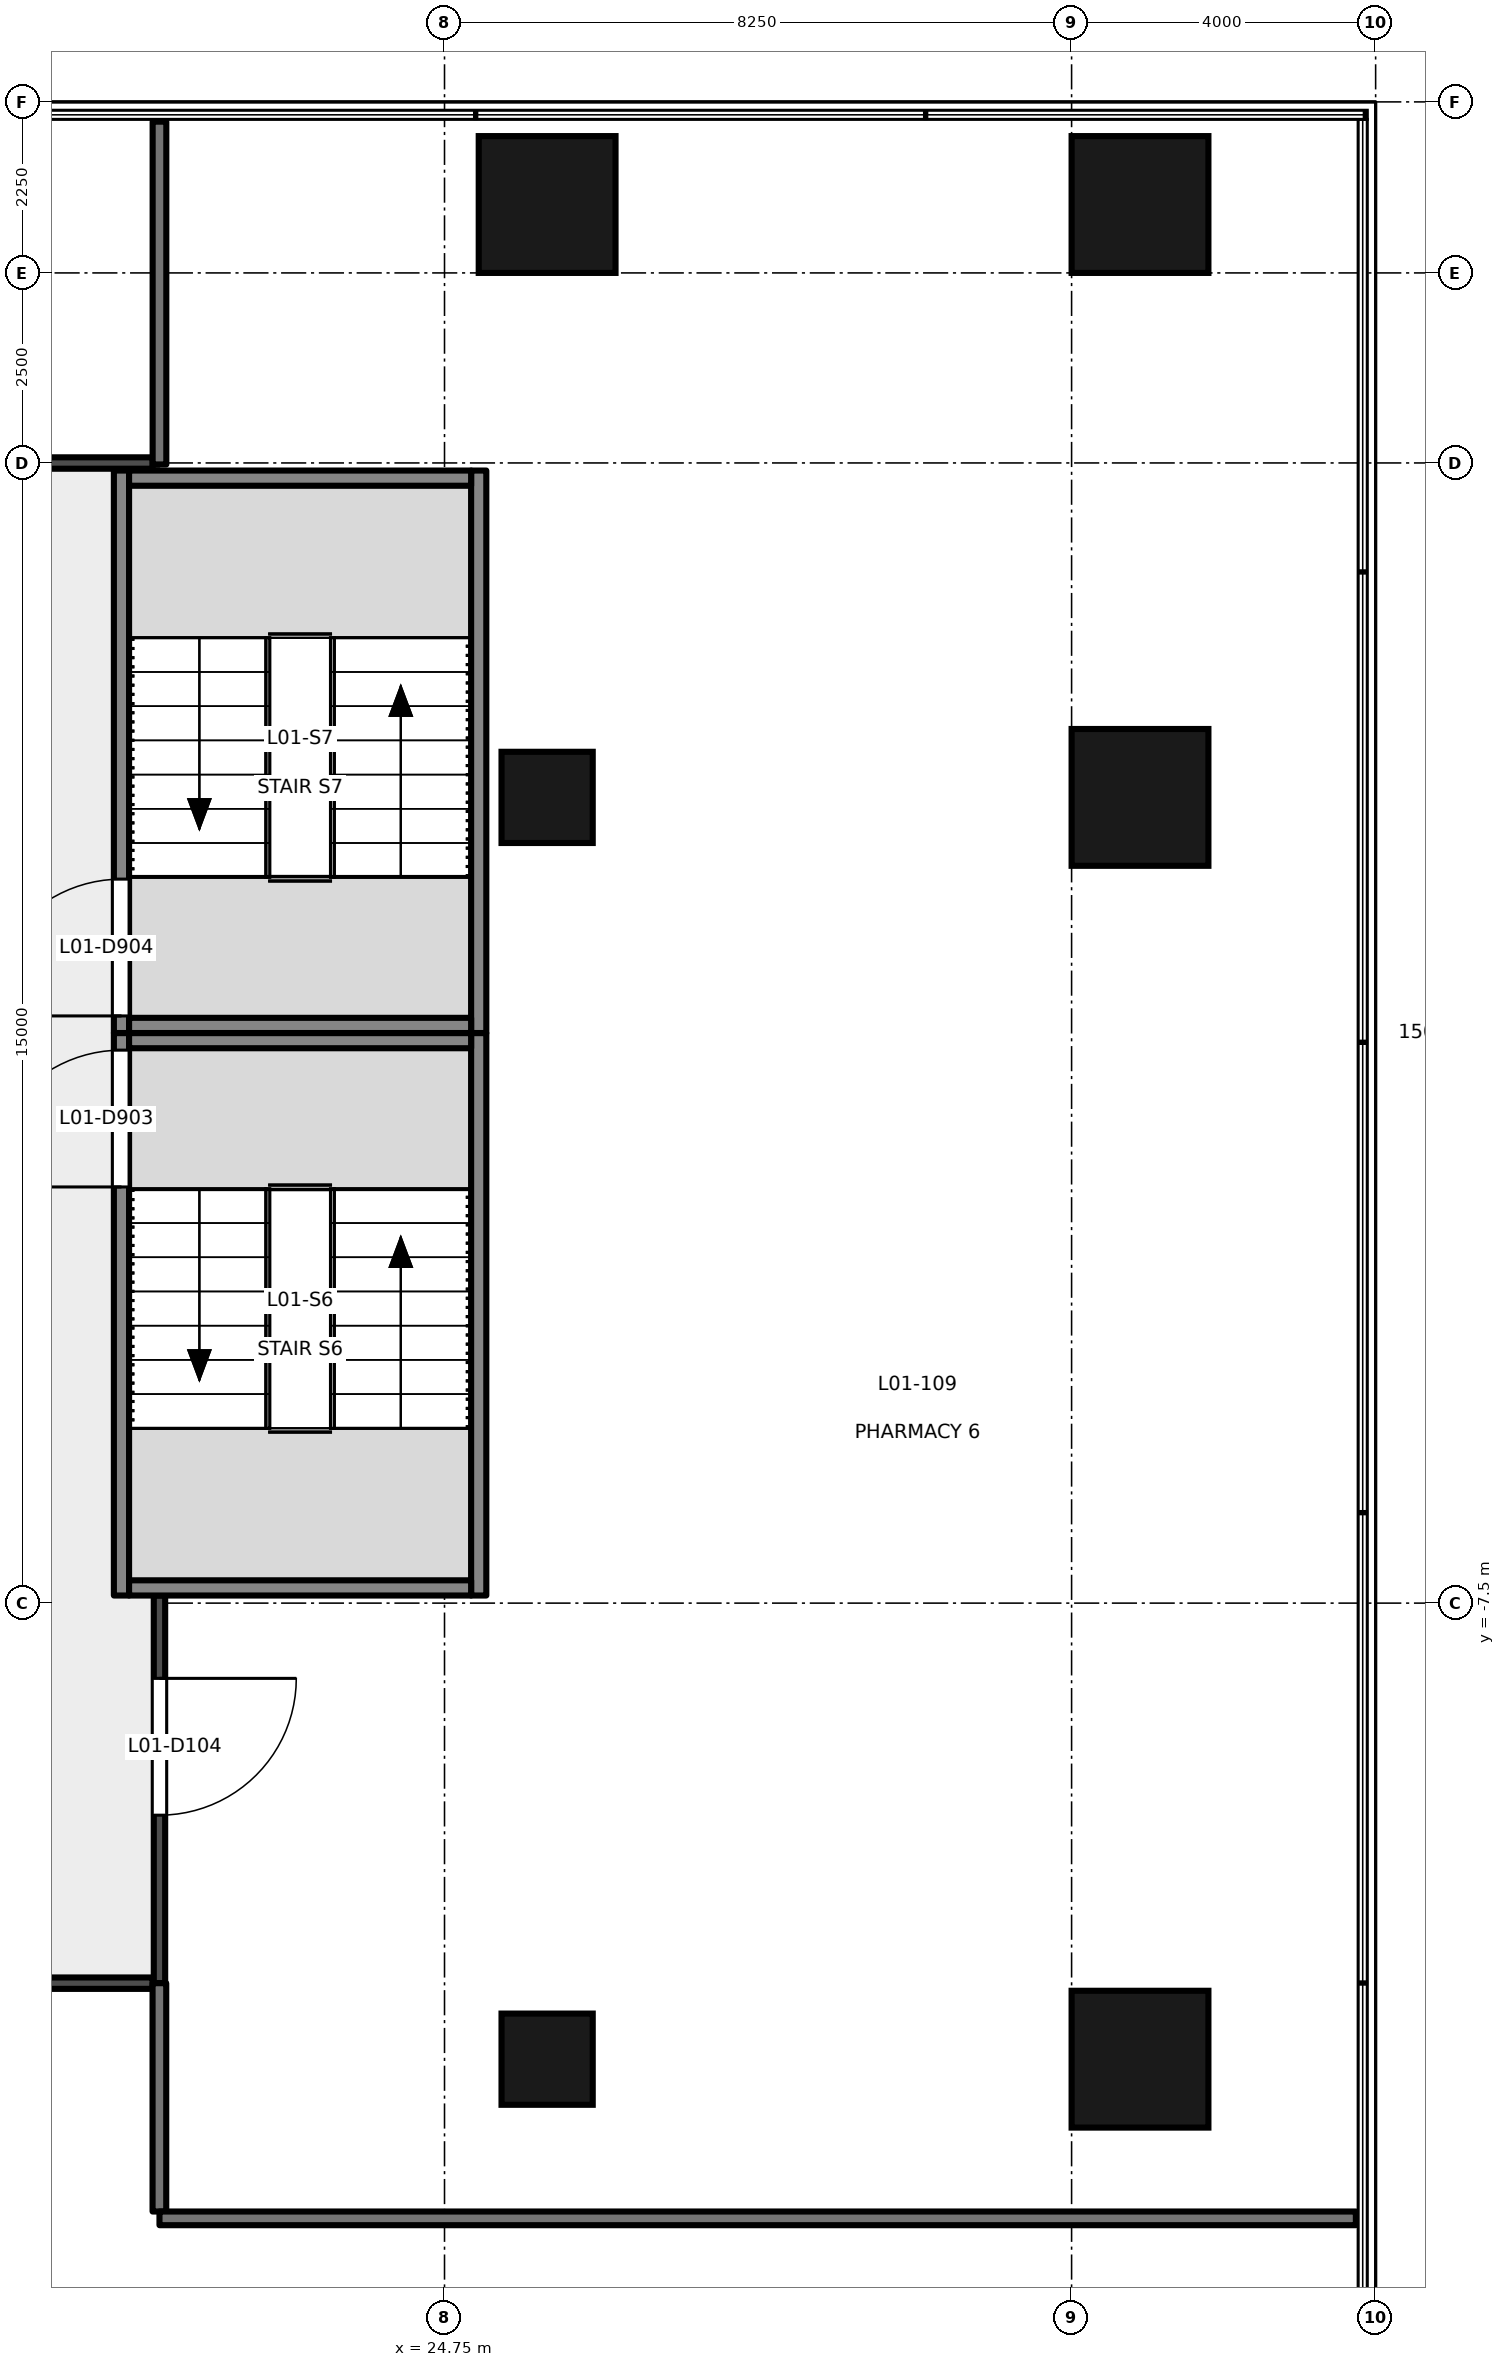
"""IFC4 building model, lengths in metres.
Left out: names, types, materials, properties, quantities, classifications, styles, units other than length and angle.
Written with IfcOpenShell. Run it as: python <this file> out.ifc"""

import sys

from ifc_helpers import new_model, si_unit, direction, frame, frame_2d, origin, origin_2d, place, context, subcontext, project, spatial, rectangle, extrude, element, fill, save


model = new_model("IFC4")
c1 = context("Model", 3, precision=1e-05, world=origin(), true_north=direction((0.0, 1.0)))
c2 = subcontext(c1, "Body", "Model", "MODEL_VIEW")
j1 = project(units=[si_unit("LENGTHUNIT", "METRE"), si_unit("PLANEANGLEUNIT", "RADIAN")], contexts=[c1])
p1 = place(None, origin())
s1 = spatial("IfcSite", under=j1, at=p1, CompositionType="ELEMENT")
p2 = place(p1, origin())
s2 = spatial("IfcBuilding", under=s1, at=p2, CompositionType="ELEMENT")
p3 = place(p2, frame((0.0, 0.0, 7.2)))
s3 = spatial("IfcBuildingStorey", under=s2, at=p3, CompositionType="ELEMENT", Elevation=7.2)
for number, where, z_axis, x_axis in (
    (1, (33.9, 10.9, -0.2), (0.0, 0.0, 1.0), (1.0, 0.0, 0.0)),
    (2, (33.9, -13.5, -0.2), (0.0, 0.0, 1.0), (0.0, 1.0, 0.0)),
    (3, (33.9, 3.1, -0.2), (0.0, 0.0, 1.0), (0.0, 1.0, 0.0)),
    (4, (26.1, 10.9, -0.2), (0.0, 0.0, 1.0), (1.0, 0.0, 0.0)),
):
    element("IfcColumn", number, at=place(p3, frame(where, z_axis=z_axis, x_axis=x_axis)), inside=s3, PredefinedType="COLUMN", context=c2, shape_type="SweptSolid", body=[
        extrude(rectangle(XDim=1.8, YDim=1.8, at=origin_2d()), origin(), (0.0, 0.0, 1.0), 5.4),
    ])
for number, where, z_axis, x_axis in (
    (5, (26.1, -13.5, -0.2), (0.0, 0.0, 1.0), (1.0, 0.0, 0.0)),
    (6, (26.1, 3.1, -0.2), (0.0, 0.0, 1.0), (1.0, 0.0, 0.0)),
):
    element("IfcColumn", number, at=place(p3, frame(where, z_axis=z_axis, x_axis=x_axis)), inside=s3, PredefinedType="COLUMN", context=c2, shape_type="SweptSolid", body=[
        extrude(rectangle(XDim=1.2, YDim=1.2, at=origin_2d()), origin(), (0.0, 0.0, 1.0), 5.4),
    ])
p4 = place(p3, frame((20.5, -7.4, -0.2), z_axis=(0.0, 0.0, 1.0), x_axis=(0.0, 1.0, 0.0)))
e7 = element("IfcWall", 7, at=p4, inside=s3, PredefinedType="SHEAR", context=c2, shape_type="SweptSolid", body=[
    extrude(rectangle(XDim=7.4, YDim=0.2, at=frame_2d((3.7, 0.0))), origin(), (0.0, 0.0, 1.0), 5.4),
])
p5 = place(p4, frame((5.375, 0.0, 0.2)))
e8 = element("IfcOpeningElement", 8, at=p5, cuts=e7, PredefinedType="OPENING", context=c2, shape_type="SweptSolid", body=[
    extrude(rectangle(XDim=1.8, YDim=2.1, at=frame_2d((0.9, 1.05))), frame((0.0, 0.111, 0.0), z_axis=(0.0, -1.0, 0.0), x_axis=(1.0, 0.0, 0.0)), (0.0, 0.0, 1.0), 0.221),
])
p6 = place(p3, frame((25.2, -7.4, -0.2), z_axis=(0.0, 0.0, 1.0), x_axis=(0.0, 1.0, 0.0)))
e9 = element("IfcWall", 9, at=p6, inside=s3, PredefinedType="SHEAR", context=c2, shape_type="SweptSolid", body=[
    extrude(rectangle(XDim=7.4, YDim=0.2, at=frame_2d((3.7, 0.0))), origin(), (0.0, 0.0, 1.0), 5.4),
])
for number, where, z_axis, x_axis in (
    (10, (20.6, -0.1, -0.2), (0.0, 0.0, 1.0), (1.0, 0.0, 0.0)),
    (11, (20.6, -7.3, -0.2), (0.0, 0.0, 1.0), (1.0, 0.0, 0.0)),
):
    element("IfcWall", number, at=place(p3, frame(where, z_axis=z_axis, x_axis=x_axis)), inside=s3, PredefinedType="SHEAR", context=c2, shape_type="SweptSolid", body=[
        extrude(rectangle(XDim=4.5, YDim=0.2, at=frame_2d((2.25, 0.0))), origin(), (0.0, 0.0, 1.0), 5.4),
    ])
p7 = place(p3, frame((20.5, 0.0, -0.2), z_axis=(0.0, 0.0, 1.0), x_axis=(0.0, 1.0, 0.0)))
e12 = element("IfcWall", 12, at=p7, inside=s3, PredefinedType="SHEAR", context=c2, shape_type="SweptSolid", body=[
    extrude(rectangle(XDim=7.4, YDim=0.2, at=frame_2d((3.7, 0.0))), origin(), (0.0, 0.0, 1.0), 5.4),
])
p8 = place(p7, frame((0.225, 0.0, 0.2)))
e13 = element("IfcOpeningElement", 13, at=p8, cuts=e12, PredefinedType="OPENING", context=c2, shape_type="SweptSolid", body=[
    extrude(rectangle(XDim=1.8, YDim=2.1, at=frame_2d((0.9, 1.05))), frame((0.0, 0.111, 0.0), z_axis=(0.0, -1.0, 0.0), x_axis=(1.0, 0.0, 0.0)), (0.0, 0.0, 1.0), 0.221),
])
p9 = place(p3, frame((25.2, 0.0, -0.2), z_axis=(0.0, 0.0, 1.0), x_axis=(0.0, 1.0, 0.0)))
e14 = element("IfcWall", 14, at=p9, inside=s3, PredefinedType="SHEAR", context=c2, shape_type="SweptSolid", body=[
    extrude(rectangle(XDim=7.4, YDim=0.2, at=frame_2d((3.7, 0.0))), origin(), (0.0, 0.0, 1.0), 5.4),
])
for number, where, z_axis, x_axis in (
    (15, (20.6, 7.3, -0.2), (0.0, 0.0, 1.0), (1.0, 0.0, 0.0)),
    (16, (20.6, 0.1, -0.2), (0.0, 0.0, 1.0), (1.0, 0.0, 0.0)),
):
    element("IfcWall", number, at=place(p3, frame(where, z_axis=z_axis, x_axis=x_axis)), inside=s3, PredefinedType="SHEAR", context=c2, shape_type="SweptSolid", body=[
        extrude(rectangle(XDim=4.5, YDim=0.2, at=frame_2d((2.25, 0.0))), origin(), (0.0, 0.0, 1.0), 5.4),
    ])
p10 = place(p3, frame((20.909, -12.5, 0.0), z_axis=(0.0, 0.0, 1.0), x_axis=(-1.0, 0.0, 0.0)))
e17 = element("IfcWall", 17, at=p10, inside=s3, PredefinedType="PARTITIONING", context=c2, shape_type="SweptSolid", body=[
    extrude(rectangle(XDim=19.339, YDim=0.15, at=frame_2d((9.669, 0.0))), origin(), (0.0, 0.0, 1.0), 3.8),
])
p11 = place(p10, frame((8.77, 0.0, 0.0)))
e18 = element("IfcOpeningElement", 18, at=p11, cuts=e17, PredefinedType="OPENING", context=c2, shape_type="SweptSolid", body=[
    extrude(rectangle(XDim=1.8, YDim=2.1, at=frame_2d((0.9, 1.05))), frame((0.0, 0.085, 0.0), z_axis=(0.0, -1.0, 0.0), x_axis=(1.0, 0.0, 0.0)), (0.0, 0.0, 1.0), 0.171),
])
p12 = place(p3, frame((21.0, -7.4, 0.0), z_axis=(0.0, 0.0, 1.0), x_axis=(0.0, -1.0, 0.0)))
e19 = element("IfcWall", 19, at=p12, inside=s3, PredefinedType="PARTITIONING", context=c2, shape_type="SweptSolid", body=[
    extrude(rectangle(XDim=5.1, YDim=0.15, at=frame_2d((2.55, 0.0))), origin(), (0.0, 0.0, 1.0), 5.2),
])
p13 = place(p12, frame((1.09, 0.0, 0.0)))
e20 = element("IfcOpeningElement", 20, at=p13, cuts=e19, PredefinedType="OPENING", context=c2, shape_type="SweptSolid", body=[
    extrude(rectangle(XDim=1.8, YDim=2.1, at=frame_2d((0.9, 1.05))), frame((0.0, 0.085, 0.0), z_axis=(0.0, -1.0, 0.0), x_axis=(1.0, 0.0, 0.0)), (0.0, 0.0, 1.0), 0.171),
])
p14 = place(p3, frame((18.0, 7.499, 0.0), z_axis=(0.0, 0.0, 1.0), x_axis=(1.0, 0.0, 0.0)))
e21 = element("IfcWall", 21, at=p14, inside=s3, PredefinedType="PARTITIONING", context=c2, shape_type="SweptSolid", body=[
    extrude(rectangle(XDim=2.91, YDim=0.15, at=frame_2d((1.455, 0.0))), origin(), (0.0, 0.0, 1.0), 4.9),
])
p15 = place(p3, frame((20.999, -12.5, 0.0), z_axis=(0.0, 0.0, 1.0), x_axis=(0.0, -1.0, 0.0)))
e22 = element("IfcWall", 22, at=p15, inside=s3, PredefinedType="PARTITIONING", context=c2, shape_type="SweptSolid", body=[
    extrude(rectangle(XDim=3.004, YDim=0.18, at=frame_2d((1.502, 0.0))), origin(), (0.0, 0.0, 1.0), 4.2),
])
p16 = place(p3, frame((21.0, -15.594, 0.0), z_axis=(0.0, 0.0, 1.0), x_axis=(1.0, 0.0, 0.0)))
e23 = element("IfcWall", 23, at=p16, inside=s3, PredefinedType="PARTITIONING", context=c2, shape_type="SweptSolid", body=[
    extrude(rectangle(XDim=15.74, YDim=0.18, at=frame_2d((7.87, 0.0))), origin(), (0.0, 0.0, 1.0), 4.2),
])
p17 = place(p3, frame((21.0, 7.48, 0.0), z_axis=(0.0, 0.0, 1.0), x_axis=(0.0, 1.0, 0.0)))
e24 = element("IfcWall", 24, at=p17, inside=s3, PredefinedType="PARTITIONING", context=c2, shape_type="SweptSolid", body=[
    extrude(rectangle(XDim=4.51, YDim=0.18, at=frame_2d((2.255, 0.0))), origin(), (0.0, 0.0, 1.0), 4.2),
])
p18 = place(p5, origin())
e25 = element("IfcDoor", 25, at=p18, inside=s3, OperationType="DOUBLE_DOOR_SINGLE_SWING", PredefinedType="DOOR", context=c2, shape_type="SweptSolid", body=[
    extrude(rectangle(XDim=1.8, YDim=2.1, at=frame_2d((0.9, 1.05))), frame((0.0, 0.025, 0.0), z_axis=(0.0, -1.0, 0.0), x_axis=(1.0, 0.0, 0.0)), (0.0, 0.0, 1.0), 0.05),
])
fill(e8, e25)
p19 = place(p8, origin())
e26 = element("IfcDoor", 26, at=p19, inside=s3, OperationType="DOUBLE_DOOR_SINGLE_SWING", PredefinedType="DOOR", context=c2, shape_type="SweptSolid", body=[
    extrude(rectangle(XDim=1.8, YDim=2.1, at=frame_2d((0.9, 1.05))), frame((0.0, 0.025, 0.0), z_axis=(0.0, -1.0, 0.0), x_axis=(1.0, 0.0, 0.0)), (0.0, 0.0, 1.0), 0.05),
])
fill(e13, e26)
p20 = place(p13, origin())
e27 = element("IfcDoor", 27, at=p20, inside=s3, OperationType="DOUBLE_DOOR_SINGLE_SWING", PredefinedType="DOOR", context=c2, shape_type="SweptSolid", body=[
    extrude(rectangle(XDim=1.8, YDim=2.1, at=frame_2d((0.9, 1.05))), frame((0.0, 0.025, 0.0), z_axis=(0.0, -1.0, 0.0), x_axis=(1.0, 0.0, 0.0)), (0.0, 0.0, 1.0), 0.05),
])
fill(e20, e27)
save(model, sys.argv[1])
